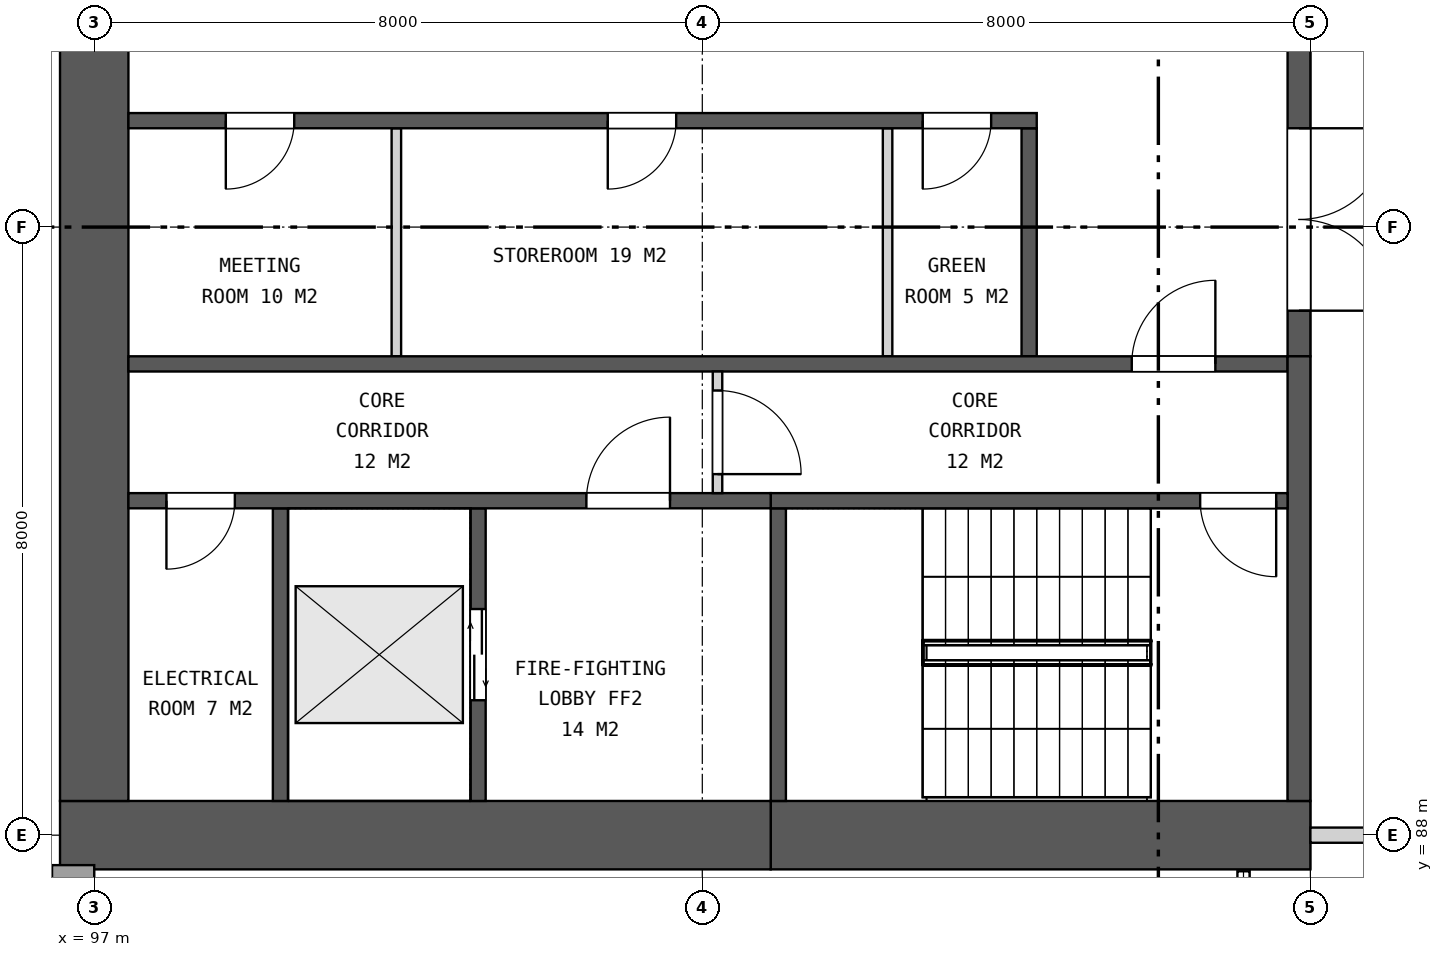
"""IFC4 building model, lengths in metres.
Left out: names, types, materials, properties, quantities, classifications, styles, units other than length and angle.
Written with IfcOpenShell. Run it as: python <this file> out.ifc"""

import sys

from ifc_helpers import new_model, si_unit, direction, frame, frame_2d, origin, place, context, subcontext, project, spatial, rectangle, extrude, element, fill, save


model = new_model("IFC4")
c1 = context("Model", 3, precision=1e-05, world=origin(), true_north=direction((0.0, 1.0)))
c2 = subcontext(c1, "Body", "Model", "MODEL_VIEW")
j1 = project(units=[si_unit("LENGTHUNIT", "METRE"), si_unit("PLANEANGLEUNIT", "RADIAN")], contexts=[c1])
p1 = place(None, origin())
s1 = spatial("IfcSite", under=j1, at=p1, CompositionType="ELEMENT")
p2 = place(p1, origin())
s2 = spatial("IfcBuilding", under=s1, at=p2, CompositionType="ELEMENT")
p3 = place(p2, frame((0.0, 0.0, 17.5)))
s3 = spatial("IfcBuildingStorey", under=s2, at=p3, CompositionType="ELEMENT", Elevation=17.5)
p4 = place(p3, frame((113.0, 88.0, 0.0), z_axis=(0.0, 0.0, 1.0), x_axis=(-1.0, 0.0, 0.0)))
e1 = element("IfcWall", 1, at=p4, inside=s3, PredefinedType="SHEAR", context=c2, shape_type="SweptSolid", body=[
    extrude(rectangle(XDim=7.1, YDim=0.9, at=frame_2d((3.55, 0.0))), origin(), (0.0, 0.0, 1.0), 7.5),
])
p5 = place(p3, frame((105.9, 88.0, 0.0), z_axis=(0.0, 0.0, 1.0), x_axis=(-1.0, 0.0, 0.0)))
e2 = element("IfcWall", 2, at=p5, inside=s3, PredefinedType="SHEAR", context=c2, shape_type="SweptSolid", body=[
    extrude(rectangle(XDim=9.35, YDim=0.9, at=frame_2d((4.675, 0.0))), origin(), (0.0, 0.0, 1.0), 7.5),
])
p6 = place(p3, frame((97.0, 111.55, 0.0), z_axis=(0.0, 0.0, 1.0), x_axis=(0.0, -1.0, 0.0)))
e3 = element("IfcWall", 3, at=p6, inside=s3, PredefinedType="SHEAR", context=c2, shape_type="SweptSolid", body=[
    extrude(rectangle(XDim=23.1, YDim=0.9, at=frame_2d((11.55, 0.0))), origin(), (0.0, 0.0, 1.0), 7.5),
])
p7 = place(p6, frame((10.35, 0.0, 0.0)))
e4 = element("IfcOpeningElement", 4, at=p7, cuts=e3, PredefinedType="OPENING", context=c2, shape_type="SweptSolid", body=[
    extrude(rectangle(XDim=2.4, YDim=2.4, at=frame_2d((1.2, 1.2))), frame((0.0, 0.46, 0.0), z_axis=(0.0, -1.0, 0.0), x_axis=(1.0, 0.0, 0.0)), (0.0, 0.0, 1.0), 0.92),
])
p8 = place(p3, frame((112.85, 105.7, 0.0), z_axis=(0.0, 0.0, 1.0), x_axis=(0.0, -1.0, 0.0)))
e5 = element("IfcWall", 5, at=p8, inside=s3, PredefinedType="SHEAR", context=c2, shape_type="SweptSolid", body=[
    extrude(rectangle(XDim=11.4, YDim=0.3, at=frame_2d((5.7, 0.0))), origin(), (0.0, 0.0, 1.0), 7.5),
])
p9 = place(p8, frame((0.6, 0.0, 0.0)))
e6 = element("IfcOpeningElement", 6, at=p9, cuts=e5, PredefinedType="OPENING", context=c2, shape_type="SweptSolid", body=[
    extrude(rectangle(XDim=2.4, YDim=2.4, at=frame_2d((1.2, 1.2))), frame((0.0, 0.16, 0.0), z_axis=(0.0, -1.0, 0.0), x_axis=(1.0, 0.0, 0.0)), (0.0, 0.0, 1.0), 0.32),
])
p10 = place(p8, frame((4.5, 0.0, 0.0)))
e7 = element("IfcOpeningElement", 7, at=p10, cuts=e5, PredefinedType="OPENING", context=c2, shape_type="SweptSolid", body=[
    extrude(rectangle(XDim=2.4, YDim=2.4, at=frame_2d((1.2, 1.2))), frame((0.0, 0.16, 0.0), z_axis=(0.0, -1.0, 0.0), x_axis=(1.0, 0.0, 0.0)), (0.0, 0.0, 1.0), 0.32),
])
p11 = place(p8, frame((8.4, 0.0, 0.0)))
e8 = element("IfcOpeningElement", 8, at=p11, cuts=e5, PredefinedType="OPENING", context=c2, shape_type="SweptSolid", body=[
    extrude(rectangle(XDim=2.4, YDim=2.4, at=frame_2d((1.2, 1.2))), frame((0.0, 0.16, 0.0), z_axis=(0.0, -1.0, 0.0), x_axis=(1.0, 0.0, 0.0)), (0.0, 0.0, 1.0), 0.32),
])
p12 = place(p3, frame((109.3, 97.3, 0.0), z_axis=(0.0, 0.0, 1.0), x_axis=(0.0, -1.0, 0.0)))
e9 = element("IfcWall", 9, at=p12, inside=s3, PredefinedType="SHEAR", context=c2, shape_type="SweptSolid", body=[
    extrude(rectangle(XDim=3.0, YDim=0.2, at=frame_2d((1.5, 0.0))), origin(), (0.0, 0.0, 1.0), 7.5),
])
for number, where, z_axis, x_axis in (
    (10, (107.438, 97.3, 0.0), (0.0, 0.0, 1.0), (0.0, -1.0, 0.0)),
    (11, (100.975, 97.3, 0.0), (0.0, 0.0, 1.0), (0.0, -1.0, 0.0)),
):
    element("IfcWall", number, at=place(p3, frame(where, z_axis=z_axis, x_axis=x_axis)), inside=s3, PredefinedType="PARTITIONING", context=c2, shape_type="SweptSolid", body=[
        extrude(rectangle(XDim=3.0, YDim=0.125, at=frame_2d((1.5, 0.0))), origin(), (0.0, 0.0, 1.0), 7.5),
    ])
p13 = place(p3, frame((109.4, 97.4, 0.0), z_axis=(0.0, 0.0, 1.0), x_axis=(-1.0, 0.0, 0.0)))
e12 = element("IfcWall", 12, at=p13, inside=s3, PredefinedType="SHEAR", context=c2, shape_type="SweptSolid", body=[
    extrude(rectangle(XDim=11.95, YDim=0.2, at=frame_2d((5.975, 0.0))), origin(), (0.0, 0.0, 1.0), 7.5),
])
p14 = place(p13, frame((0.6, 0.0, 0.0)))
e13 = element("IfcOpeningElement", 13, at=p14, cuts=e12, PredefinedType="OPENING", context=c2, shape_type="SweptSolid", body=[
    extrude(rectangle(XDim=0.9, YDim=2.1, at=frame_2d((0.45, 1.05))), frame((0.0, 0.11, 0.0), z_axis=(0.0, -1.0, 0.0), x_axis=(1.0, 0.0, 0.0)), (0.0, 0.0, 1.0), 0.22),
])
p15 = place(p13, frame((4.744, 0.0, 0.0)))
e14 = element("IfcOpeningElement", 14, at=p15, cuts=e12, PredefinedType="OPENING", context=c2, shape_type="SweptSolid", body=[
    extrude(rectangle(XDim=0.9, YDim=2.1, at=frame_2d((0.45, 1.05))), frame((0.0, 0.11, 0.0), z_axis=(0.0, -1.0, 0.0), x_axis=(1.0, 0.0, 0.0)), (0.0, 0.0, 1.0), 0.22),
])
p16 = place(p13, frame((9.769, 0.0, 0.0)))
e15 = element("IfcOpeningElement", 15, at=p16, cuts=e12, PredefinedType="OPENING", context=c2, shape_type="SweptSolid", body=[
    extrude(rectangle(XDim=0.9, YDim=2.1, at=frame_2d((0.45, 1.05))), frame((0.0, 0.11, 0.0), z_axis=(0.0, -1.0, 0.0), x_axis=(1.0, 0.0, 0.0)), (0.0, 0.0, 1.0), 0.22),
])
p17 = place(p3, frame((112.7, 94.2, 0.0), z_axis=(0.0, 0.0, 1.0), x_axis=(-1.0, 0.0, 0.0)))
e16 = element("IfcWall", 16, at=p17, inside=s3, PredefinedType="SHEAR", context=c2, shape_type="SweptSolid", body=[
    extrude(rectangle(XDim=15.25, YDim=0.2, at=frame_2d((7.625, 0.0))), origin(), (0.0, 0.0, 1.0), 7.5),
])
p18 = place(p17, frame((0.95, 0.0, 0.0)))
e17 = element("IfcOpeningElement", 17, at=p18, cuts=e16, PredefinedType="OPENING", context=c2, shape_type="SweptSolid", body=[
    extrude(rectangle(XDim=1.1, YDim=2.1, at=frame_2d((0.55, 1.05))), frame((0.0, 0.11, 0.0), z_axis=(0.0, -1.0, 0.0), x_axis=(1.0, 0.0, 0.0)), (0.0, 0.0, 1.0), 0.22),
])
p19 = place(p3, frame((112.85, 94.3, 0.0), z_axis=(0.0, 0.0, 1.0), x_axis=(0.0, -1.0, 0.0)))
e18 = element("IfcWall", 18, at=p19, inside=s3, PredefinedType="SHEAR", context=c2, shape_type="SweptSolid", body=[
    extrude(rectangle(XDim=5.85, YDim=0.3, at=frame_2d((2.925, 0.0))), origin(), (0.0, 0.0, 1.0), 7.5),
])
p20 = place(p3, frame((106.0, 92.3, 0.0), z_axis=(0.0, 0.0, 1.0), x_axis=(0.0, -1.0, 0.0)))
e19 = element("IfcWall", 19, at=p20, inside=s3, PredefinedType="SHEAR", context=c2, shape_type="SweptSolid", body=[
    extrude(rectangle(XDim=3.85, YDim=0.2, at=frame_2d((1.925, 0.0))), origin(), (0.0, 0.0, 1.0), 7.5),
])
p21 = place(p3, frame((102.05, 92.3, 0.0), z_axis=(0.0, 0.0, 1.0), x_axis=(0.0, -1.0, 0.0)))
e20 = element("IfcWall", 20, at=p21, inside=s3, PredefinedType="SHEAR", context=c2, shape_type="SweptSolid", body=[
    extrude(rectangle(XDim=3.85, YDim=0.2, at=frame_2d((1.925, 0.0))), origin(), (0.0, 0.0, 1.0), 7.5),
])
p22 = place(p21, frame((1.325, 0.0, 0.0)))
e21 = element("IfcOpeningElement", 21, at=p22, cuts=e20, PredefinedType="OPENING", context=c2, shape_type="SweptSolid", body=[
    extrude(rectangle(XDim=1.2, YDim=2.1, at=frame_2d((0.6, 1.05))), frame((0.0, 0.11, 0.0), z_axis=(0.0, -1.0, 0.0), x_axis=(1.0, 0.0, 0.0)), (0.0, 0.0, 1.0), 0.22),
])
p23 = place(p3, frame((99.45, 92.3, 0.0), z_axis=(0.0, 0.0, 1.0), x_axis=(0.0, -1.0, 0.0)))
e22 = element("IfcWall", 22, at=p23, inside=s3, PredefinedType="SHEAR", context=c2, shape_type="SweptSolid", body=[
    extrude(rectangle(XDim=3.85, YDim=0.2, at=frame_2d((1.925, 0.0))), origin(), (0.0, 0.0, 1.0), 7.5),
])
p24 = place(p3, frame((112.7, 92.4, 0.0), z_axis=(0.0, 0.0, 1.0), x_axis=(-1.0, 0.0, 0.0)))
e23 = element("IfcWall", 23, at=p24, inside=s3, PredefinedType="SHEAR", context=c2, shape_type="SweptSolid", body=[
    extrude(rectangle(XDim=6.8, YDim=0.2, at=frame_2d((3.4, 0.0))), origin(), (0.0, 0.0, 1.0), 7.5),
])
p25 = place(p24, frame((0.15, 0.0, 0.0)))
e24 = element("IfcOpeningElement", 24, at=p25, cuts=e23, PredefinedType="OPENING", context=c2, shape_type="SweptSolid", body=[
    extrude(rectangle(XDim=1.0, YDim=2.1, at=frame_2d((0.5, 1.05))), frame((0.0, 0.11, 0.0), z_axis=(0.0, -1.0, 0.0), x_axis=(1.0, 0.0, 0.0)), (0.0, 0.0, 1.0), 0.22),
])
p26 = place(p3, frame((105.9, 92.4, 0.0), z_axis=(0.0, 0.0, 1.0), x_axis=(-1.0, 0.0, 0.0)))
e25 = element("IfcWall", 25, at=p26, inside=s3, PredefinedType="SHEAR", context=c2, shape_type="SweptSolid", body=[
    extrude(rectangle(XDim=8.45, YDim=0.2, at=frame_2d((4.225, 0.0))), origin(), (0.0, 0.0, 1.0), 7.5),
])
p27 = place(p26, frame((1.325, 0.0, 0.0)))
e26 = element("IfcOpeningElement", 26, at=p27, cuts=e25, PredefinedType="OPENING", context=c2, shape_type="SweptSolid", body=[
    extrude(rectangle(XDim=1.1, YDim=2.1, at=frame_2d((0.55, 1.05))), frame((0.0, 0.11, 0.0), z_axis=(0.0, -1.0, 0.0), x_axis=(1.0, 0.0, 0.0)), (0.0, 0.0, 1.0), 0.22),
])
p28 = place(p26, frame((7.05, 0.0, 0.0)))
e27 = element("IfcOpeningElement", 27, at=p28, cuts=e25, PredefinedType="OPENING", context=c2, shape_type="SweptSolid", body=[
    extrude(rectangle(XDim=0.9, YDim=2.1, at=frame_2d((0.45, 1.05))), frame((0.0, 0.11, 0.0), z_axis=(0.0, -1.0, 0.0), x_axis=(1.0, 0.0, 0.0)), (0.0, 0.0, 1.0), 0.22),
])
p29 = place(p3, frame((105.2, 94.1, 0.0), z_axis=(0.0, 0.0, 1.0), x_axis=(0.0, -1.0, 0.0)))
e28 = element("IfcWall", 28, at=p29, inside=s3, PredefinedType="PARTITIONING", context=c2, shape_type="SweptSolid", body=[
    extrude(rectangle(XDim=1.6, YDim=0.125, at=frame_2d((0.8, 0.0))), origin(), (0.0, 0.0, 1.0), 7.5),
])
p30 = place(p29, frame((0.25, 0.0, 0.0)))
e29 = element("IfcOpeningElement", 29, at=p30, cuts=e28, PredefinedType="OPENING", context=c2, shape_type="SweptSolid", body=[
    extrude(rectangle(XDim=1.1, YDim=2.1, at=frame_2d((0.55, 1.05))), frame((0.0, 0.073, 0.0), z_axis=(0.0, -1.0, 0.0), x_axis=(1.0, 0.0, 0.0)), (0.0, 0.0, 1.0), 0.145),
])
p31 = place(p3, frame((96.445, 87.403, 0.0), z_axis=(0.0, 0.0, 1.0), x_axis=(1.0, 0.0, 0.0)))
e30 = element("IfcWall", 30, at=p31, inside=s3, PredefinedType="SOLIDWALL", context=c2, shape_type="SweptSolid", body=[
    extrude(rectangle(XDim=0.555, YDim=0.406, at=frame_2d((0.277, 0.0))), origin(), (0.0, 0.0, 1.0), 7.1),
])
p32 = place(p3, frame((113.0, 88.0, 0.0), z_axis=(0.0, 0.0, 1.0), x_axis=(1.0, 0.0, 0.0)))
e31 = element("IfcWall", 31, at=p32, inside=s3, PredefinedType="PARTITIONING", context=c2, shape_type="SweptSolid", body=[
    extrude(rectangle(XDim=7.4, YDim=0.2, at=frame_2d((3.7, 0.0))), origin(), (0.0, 0.0, 1.0), 6.551),
])
p33 = place(p32, frame((2.8, 0.0, 0.0)))
e32 = element("IfcOpeningElement", 32, at=p33, cuts=e31, PredefinedType="OPENING", context=c2, shape_type="SweptSolid", body=[
    extrude(rectangle(XDim=2.4, YDim=2.4, at=frame_2d((1.2, 1.2))), frame((0.0, 0.11, 0.0), z_axis=(0.0, -1.0, 0.0), x_axis=(1.0, 0.0, 0.0)), (0.0, 0.0, 1.0), 0.22),
])
p34 = place(p11, origin())
e33 = element("IfcDoor", 33, at=p34, inside=s3, OperationType="DOUBLE_DOOR_SINGLE_SWING", PredefinedType="DOOR", context=c2, shape_type="SweptSolid", body=[
    extrude(rectangle(XDim=2.4, YDim=2.4, at=frame_2d((1.2, 1.2))), frame((0.0, 0.025, 0.0), z_axis=(0.0, -1.0, 0.0), x_axis=(1.0, 0.0, 0.0)), (0.0, 0.0, 1.0), 0.05),
])
fill(e8, e33)
p35 = place(p14, origin())
e34 = element("IfcDoor", 34, at=p35, inside=s3, OperationType="SINGLE_SWING_RIGHT", PredefinedType="DOOR", context=c2, shape_type="SweptSolid", body=[
    extrude(rectangle(XDim=0.9, YDim=2.1, at=frame_2d((0.45, 1.05))), frame((0.0, 0.025, 0.0), z_axis=(0.0, -1.0, 0.0), x_axis=(1.0, 0.0, 0.0)), (0.0, 0.0, 1.0), 0.05),
])
fill(e13, e34)
p36 = place(p15, origin())
e35 = element("IfcDoor", 35, at=p36, inside=s3, OperationType="SINGLE_SWING_RIGHT", PredefinedType="DOOR", context=c2, shape_type="SweptSolid", body=[
    extrude(rectangle(XDim=0.9, YDim=2.1, at=frame_2d((0.45, 1.05))), frame((0.0, 0.025, 0.0), z_axis=(0.0, -1.0, 0.0), x_axis=(1.0, 0.0, 0.0)), (0.0, 0.0, 1.0), 0.05),
])
fill(e14, e35)
p37 = place(p16, origin())
e36 = element("IfcDoor", 36, at=p37, inside=s3, OperationType="SINGLE_SWING_RIGHT", PredefinedType="DOOR", context=c2, shape_type="SweptSolid", body=[
    extrude(rectangle(XDim=0.9, YDim=2.1, at=frame_2d((0.45, 1.05))), frame((0.0, 0.025, 0.0), z_axis=(0.0, -1.0, 0.0), x_axis=(1.0, 0.0, 0.0)), (0.0, 0.0, 1.0), 0.05),
])
fill(e15, e36)
p38 = place(p18, frame((1.1, 0.0, 0.0), z_axis=(0.0, 0.0, 1.0), x_axis=(-1.0, 0.0, 0.0)))
e37 = element("IfcDoor", 37, at=p38, inside=s3, OperationType="SINGLE_SWING_RIGHT", PredefinedType="DOOR", context=c2, shape_type="SweptSolid", body=[
    extrude(rectangle(XDim=1.1, YDim=2.1, at=frame_2d((0.55, 1.05))), frame((0.0, 0.025, 0.0), z_axis=(0.0, -1.0, 0.0), x_axis=(1.0, 0.0, 0.0)), (0.0, 0.0, 1.0), 0.05),
])
fill(e17, e37)
p39 = place(p22, origin())
e38 = element("IfcDoor", 38, at=p39, inside=s3, OperationType="DOUBLE_DOOR_SLIDING", PredefinedType="DOOR", context=c2, shape_type="SweptSolid", body=[
    extrude(rectangle(XDim=1.2, YDim=2.1, at=frame_2d((0.6, 1.05))), frame((0.0, 0.025, 0.0), z_axis=(0.0, -1.0, 0.0), x_axis=(1.0, 0.0, 0.0)), (0.0, 0.0, 1.0), 0.05),
])
fill(e21, e38)
p40 = place(p25, origin())
e39 = element("IfcDoor", 39, at=p40, inside=s3, OperationType="SINGLE_SWING_LEFT", PredefinedType="DOOR", context=c2, shape_type="SweptSolid", body=[
    extrude(rectangle(XDim=1.0, YDim=2.1, at=frame_2d((0.5, 1.05))), frame((0.0, 0.025, 0.0), z_axis=(0.0, -1.0, 0.0), x_axis=(1.0, 0.0, 0.0)), (0.0, 0.0, 1.0), 0.05),
])
fill(e24, e39)
p41 = place(p27, frame((1.1, 0.0, 0.0), z_axis=(0.0, 0.0, 1.0), x_axis=(-1.0, 0.0, 0.0)))
e40 = element("IfcDoor", 40, at=p41, inside=s3, OperationType="SINGLE_SWING_RIGHT", PredefinedType="DOOR", context=c2, shape_type="SweptSolid", body=[
    extrude(rectangle(XDim=1.1, YDim=2.1, at=frame_2d((0.55, 1.05))), frame((0.0, 0.025, 0.0), z_axis=(0.0, -1.0, 0.0), x_axis=(1.0, 0.0, 0.0)), (0.0, 0.0, 1.0), 0.05),
])
fill(e26, e40)
p42 = place(p28, origin())
e41 = element("IfcDoor", 41, at=p42, inside=s3, OperationType="SINGLE_SWING_RIGHT", PredefinedType="DOOR", context=c2, shape_type="SweptSolid", body=[
    extrude(rectangle(XDim=0.9, YDim=2.1, at=frame_2d((0.45, 1.05))), frame((0.0, 0.025, 0.0), z_axis=(0.0, -1.0, 0.0), x_axis=(1.0, 0.0, 0.0)), (0.0, 0.0, 1.0), 0.05),
])
fill(e27, e41)
p43 = place(p30, origin())
e42 = element("IfcDoor", 42, at=p43, inside=s3, OperationType="SINGLE_SWING_RIGHT", PredefinedType="DOOR", context=c2, shape_type="SweptSolid", body=[
    extrude(rectangle(XDim=1.1, YDim=2.1, at=frame_2d((0.55, 1.05))), frame((0.0, 0.025, 0.0), z_axis=(0.0, -1.0, 0.0), x_axis=(1.0, 0.0, 0.0)), (0.0, 0.0, 1.0), 0.05),
])
fill(e29, e42)
save(model, sys.argv[1])
